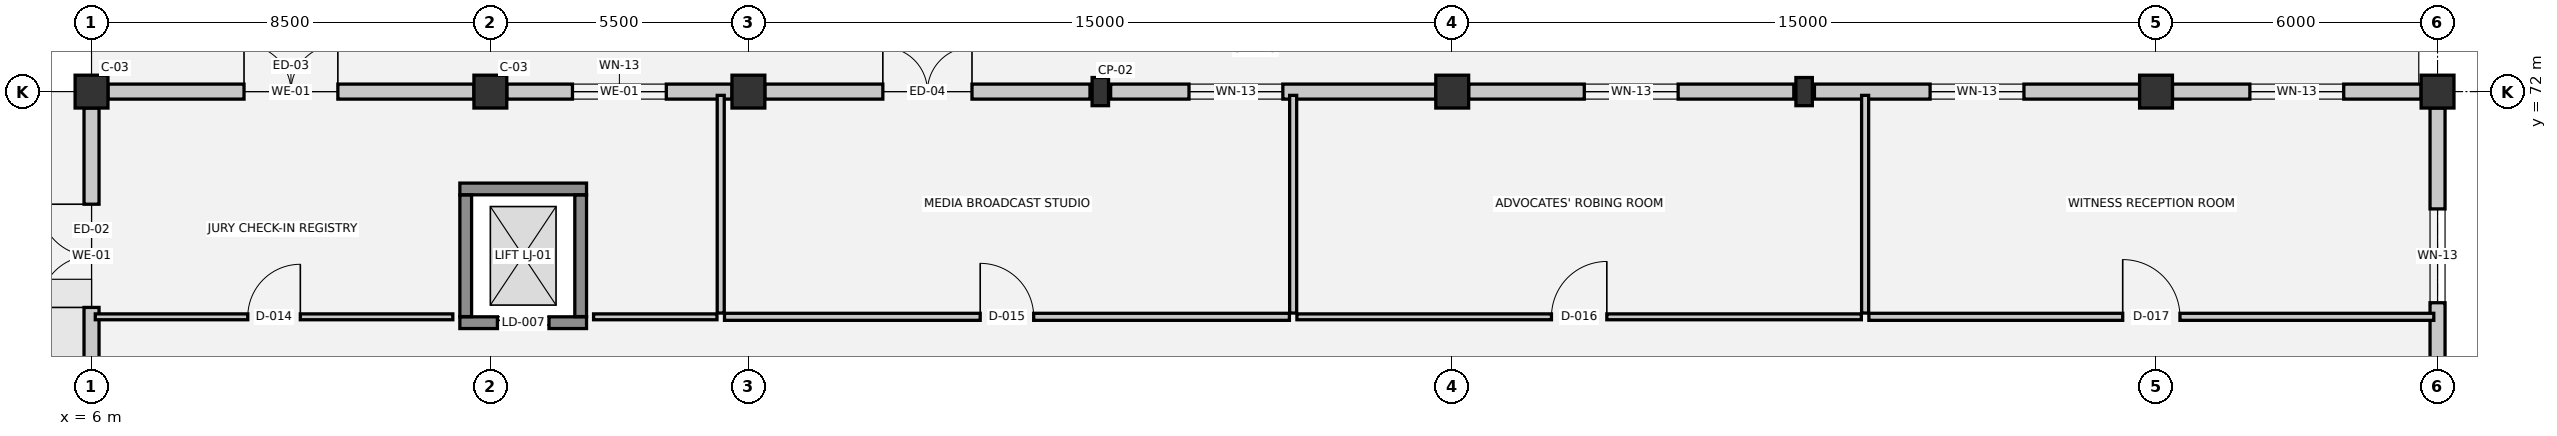
"""IFC4 building model, lengths in metres.
Left out: names, types, materials, properties, quantities, classifications, styles, units other than length and angle.
Written with IfcOpenShell. Run it as: python <this file> out.ifc"""

import sys

from ifc_helpers import new_model, si_unit, direction, frame, frame_2d, origin, origin_2d, place, context, subcontext, project, spatial, rectangle, extrude, element, fill, save


model = new_model("IFC4")
c1 = context("Model", 3, precision=1e-05, world=origin(), true_north=direction((0.0, 1.0)))
c2 = subcontext(c1, "Body", "Model", "MODEL_VIEW")
j1 = project(units=[si_unit("LENGTHUNIT", "METRE"), si_unit("PLANEANGLEUNIT", "RADIAN")], contexts=[c1])
p1 = place(None, origin())
s1 = spatial("IfcSite", under=j1, at=p1, CompositionType="ELEMENT")
p2 = place(p1, origin())
s2 = spatial("IfcBuilding", under=s1, at=p2, CompositionType="ELEMENT")
p3 = place(p2, origin())
s3 = spatial("IfcBuildingStorey", under=s2, at=p3, CompositionType="ELEMENT", Elevation=0.0)
for number, where, z_axis, x_axis in (
    (1, (6.0, 72.0, 0.0), (0.0, 0.0, 1.0), (1.0, 0.0, 0.0)),
    (2, (14.5, 72.0, 0.0), (0.0, 0.0, 1.0), (1.0, 0.0, 0.0)),
    (3, (20.0, 72.0, 0.0), (0.0, 0.0, 1.0), (1.0, 0.0, 0.0)),
    (4, (35.0, 72.0, 0.0), (0.0, 0.0, 1.0), (1.0, 0.0, 0.0)),
    (5, (50.0, 72.0, 0.0), (0.0, 0.0, 1.0), (1.0, 0.0, 0.0)),
    (6, (56.0, 72.0, 0.0), (0.0, 0.0, 1.0), (1.0, 0.0, 0.0)),
):
    element("IfcColumn", number, at=place(p3, frame(where, z_axis=z_axis, x_axis=x_axis)), inside=s3, PredefinedType="COLUMN", context=c2, shape_type="SweptSolid", body=[
        extrude(rectangle(XDim=0.7, YDim=0.7, at=origin_2d()), origin(), (0.0, 0.0, 1.0), 5.4),
    ])
for number, where, z_axis, x_axis in (
    (7, (27.5, 72.0, 0.0), (0.0, 0.0, 1.0), (1.0, 0.0, 0.0)),
    (8, (42.5, 72.0, 0.0), (0.0, 0.0, 1.0), (1.0, 0.0, 0.0)),
):
    element("IfcColumn", number, at=place(p3, frame(where, z_axis=z_axis, x_axis=x_axis)), inside=s3, PredefinedType="PILASTER", context=c2, shape_type="SweptSolid", body=[
        extrude(rectangle(XDim=0.35, YDim=0.6, at=origin_2d()), origin(), (0.0, 0.0, 1.0), 5.4),
    ])
p4 = place(p3, frame((6.0, 65.35, 0.0), z_axis=(0.0, 0.0, 1.0), x_axis=(0.0, 1.0, 0.0)))
e9 = element("IfcWall", 9, at=p4, inside=s3, PredefinedType="SOLIDWALL", context=c2, shape_type="SweptSolid", body=[
    extrude(rectangle(XDim=6.3, YDim=0.32, at=frame_2d((3.15, 0.0))), origin(), (0.0, 0.0, 1.0), 4.01),
])
p5 = place(p4, frame((2.05, 0.0, 0.0)))
e10 = element("IfcOpeningElement", 10, at=p5, cuts=e9, PredefinedType="OPENING", context=c2, shape_type="SweptSolid", body=[
    extrude(rectangle(XDim=2.2, YDim=2.4, at=frame_2d((1.1, 1.2))), frame((0.0, 0.17, 0.0), z_axis=(0.0, -1.0, 0.0), x_axis=(1.0, 0.0, 0.0)), (0.0, 0.0, 1.0), 0.34),
])
p6 = place(p3, frame((6.35, 72.0, 0.0), z_axis=(0.0, 0.0, 1.0), x_axis=(1.0, 0.0, 0.0)))
e11 = element("IfcWall", 11, at=p6, inside=s3, PredefinedType="SOLIDWALL", context=c2, shape_type="SweptSolid", body=[
    extrude(rectangle(XDim=7.8, YDim=0.32, at=frame_2d((3.9, 0.0))), origin(), (0.0, 0.0, 1.0), 4.01),
])
p7 = place(p6, frame((2.9, 0.0, 0.0)))
e12 = element("IfcOpeningElement", 12, at=p7, cuts=e11, PredefinedType="OPENING", context=c2, shape_type="SweptSolid", body=[
    extrude(rectangle(XDim=2.0, YDim=2.3, at=frame_2d((1.0, 1.15))), frame((0.0, 0.17, 0.0), z_axis=(0.0, -1.0, 0.0), x_axis=(1.0, 0.0, 0.0)), (0.0, 0.0, 1.0), 0.34),
])
p8 = place(p3, frame((14.85, 72.0, 0.0), z_axis=(0.0, 0.0, 1.0), x_axis=(1.0, 0.0, 0.0)))
e13 = element("IfcWall", 13, at=p8, inside=s3, PredefinedType="SOLIDWALL", context=c2, shape_type="SweptSolid", body=[
    extrude(rectangle(XDim=4.8, YDim=0.32, at=frame_2d((2.4, 0.0))), origin(), (0.0, 0.0, 1.0), 4.01),
])
p9 = place(p8, frame((1.4, 0.0, 0.9)))
e14 = element("IfcOpeningElement", 14, at=p9, cuts=e13, PredefinedType="OPENING", context=c2, shape_type="SweptSolid", body=[
    extrude(rectangle(XDim=2.0, YDim=2.2, at=frame_2d((1.0, 1.1))), frame((0.0, 0.17, 0.0), z_axis=(0.0, -1.0, 0.0), x_axis=(1.0, 0.0, 0.0)), (0.0, 0.0, 1.0), 0.34),
])
p10 = place(p3, frame((20.35, 72.0, 0.0), z_axis=(0.0, 0.0, 1.0), x_axis=(1.0, 0.0, 0.0)))
e15 = element("IfcWall", 15, at=p10, inside=s3, PredefinedType="SOLIDWALL", context=c2, shape_type="SweptSolid", body=[
    extrude(rectangle(XDim=6.93, YDim=0.32, at=frame_2d((3.465, 0.0))), origin(), (0.0, 0.0, 1.0), 4.01),
])
p11 = place(p10, frame((2.515, 0.0, 0.0)))
e16 = element("IfcOpeningElement", 16, at=p11, cuts=e15, PredefinedType="OPENING", context=c2, shape_type="SweptSolid", body=[
    extrude(rectangle(XDim=1.9, YDim=2.25, at=frame_2d((0.95, 1.125))), frame((0.0, 0.17, 0.0), z_axis=(0.0, -1.0, 0.0), x_axis=(1.0, 0.0, 0.0)), (0.0, 0.0, 1.0), 0.34),
])
p12 = place(p3, frame((27.72, 72.0, 0.0), z_axis=(0.0, 0.0, 1.0), x_axis=(1.0, 0.0, 0.0)))
e17 = element("IfcWall", 17, at=p12, inside=s3, PredefinedType="SOLIDWALL", context=c2, shape_type="SweptSolid", body=[
    extrude(rectangle(XDim=6.93, YDim=0.32, at=frame_2d((3.465, 0.0))), origin(), (0.0, 0.0, 1.0), 4.01),
])
p13 = place(p12, frame((1.67, 0.0, 0.9)))
e18 = element("IfcOpeningElement", 18, at=p13, cuts=e17, PredefinedType="OPENING", context=c2, shape_type="SweptSolid", body=[
    extrude(rectangle(XDim=2.0, YDim=2.2, at=frame_2d((1.0, 1.1))), frame((0.0, 0.17, 0.0), z_axis=(0.0, -1.0, 0.0), x_axis=(1.0, 0.0, 0.0)), (0.0, 0.0, 1.0), 0.34),
])
p14 = place(p3, frame((35.35, 72.0, 0.0), z_axis=(0.0, 0.0, 1.0), x_axis=(1.0, 0.0, 0.0)))
e19 = element("IfcWall", 19, at=p14, inside=s3, PredefinedType="SOLIDWALL", context=c2, shape_type="SweptSolid", body=[
    extrude(rectangle(XDim=6.93, YDim=0.32, at=frame_2d((3.465, 0.0))), origin(), (0.0, 0.0, 1.0), 4.01),
])
p15 = place(p14, frame((2.465, 0.0, 0.9)))
e20 = element("IfcOpeningElement", 20, at=p15, cuts=e19, PredefinedType="OPENING", context=c2, shape_type="SweptSolid", body=[
    extrude(rectangle(XDim=2.0, YDim=2.2, at=frame_2d((1.0, 1.1))), frame((0.0, 0.17, 0.0), z_axis=(0.0, -1.0, 0.0), x_axis=(1.0, 0.0, 0.0)), (0.0, 0.0, 1.0), 0.34),
])
p16 = place(p3, frame((42.72, 72.0, 0.0), z_axis=(0.0, 0.0, 1.0), x_axis=(1.0, 0.0, 0.0)))
e21 = element("IfcWall", 21, at=p16, inside=s3, PredefinedType="SOLIDWALL", context=c2, shape_type="SweptSolid", body=[
    extrude(rectangle(XDim=6.93, YDim=0.32, at=frame_2d((3.465, 0.0))), origin(), (0.0, 0.0, 1.0), 4.01),
])
p17 = place(p16, frame((2.465, 0.0, 0.9)))
e22 = element("IfcOpeningElement", 22, at=p17, cuts=e21, PredefinedType="OPENING", context=c2, shape_type="SweptSolid", body=[
    extrude(rectangle(XDim=2.0, YDim=2.2, at=frame_2d((1.0, 1.1))), frame((0.0, 0.17, 0.0), z_axis=(0.0, -1.0, 0.0), x_axis=(1.0, 0.0, 0.0)), (0.0, 0.0, 1.0), 0.34),
])
p18 = place(p3, frame((50.35, 72.0, 0.0), z_axis=(0.0, 0.0, 1.0), x_axis=(1.0, 0.0, 0.0)))
e23 = element("IfcWall", 23, at=p18, inside=s3, PredefinedType="SOLIDWALL", context=c2, shape_type="SweptSolid", body=[
    extrude(rectangle(XDim=5.3, YDim=0.32, at=frame_2d((2.65, 0.0))), origin(), (0.0, 0.0, 1.0), 4.01),
])
p19 = place(p18, frame((1.65, 0.0, 0.9)))
e24 = element("IfcOpeningElement", 24, at=p19, cuts=e23, PredefinedType="OPENING", context=c2, shape_type="SweptSolid", body=[
    extrude(rectangle(XDim=2.0, YDim=2.2, at=frame_2d((1.0, 1.1))), frame((0.0, 0.17, 0.0), z_axis=(0.0, -1.0, 0.0), x_axis=(1.0, 0.0, 0.0)), (0.0, 0.0, 1.0), 0.34),
])
p20 = place(p3, frame((56.0, 71.65, 0.0), z_axis=(0.0, 0.0, 1.0), x_axis=(0.0, -1.0, 0.0)))
e25 = element("IfcWall", 25, at=p20, inside=s3, PredefinedType="SOLIDWALL", context=c2, shape_type="SweptSolid", body=[
    extrude(rectangle(XDim=6.3, YDim=0.32, at=frame_2d((3.15, 0.0))), origin(), (0.0, 0.0, 1.0), 4.01),
])
p21 = place(p20, frame((2.15, 0.0, 0.9)))
e26 = element("IfcOpeningElement", 26, at=p21, cuts=e25, PredefinedType="OPENING", context=c2, shape_type="SweptSolid", body=[
    extrude(rectangle(XDim=2.0, YDim=2.2, at=frame_2d((1.0, 1.1))), frame((0.0, 0.17, 0.0), z_axis=(0.0, -1.0, 0.0), x_axis=(1.0, 0.0, 0.0)), (0.0, 0.0, 1.0), 0.34),
])
p22 = place(p3, frame((13.85, 67.075, 0.0), z_axis=(0.0, 0.0, 1.0), x_axis=(1.0, 0.0, 0.0)))
e27 = element("IfcWall", 27, at=p22, inside=s3, PredefinedType="SHEAR", context=c2, shape_type="SweptSolid", body=[
    extrude(rectangle(XDim=2.7, YDim=0.25, at=frame_2d((1.35, 0.0))), origin(), (0.0, 0.0, 1.0), 5.4),
])
p23 = place(p22, frame((0.8, 0.0, 0.0)))
e28 = element("IfcOpeningElement", 28, at=p23, cuts=e27, PredefinedType="OPENING", context=c2, shape_type="SweptSolid", body=[
    extrude(rectangle(XDim=1.1, YDim=2.15, at=frame_2d((0.55, 1.075))), frame((0.0, 0.135, 0.0), z_axis=(0.0, -1.0, 0.0), x_axis=(1.0, 0.0, 0.0)), (0.0, 0.0, 1.0), 0.27),
])
p24 = place(p3, frame((16.55, 69.925, 0.0), z_axis=(0.0, 0.0, 1.0), x_axis=(-1.0, 0.0, 0.0)))
e29 = element("IfcWall", 29, at=p24, inside=s3, PredefinedType="SHEAR", context=c2, shape_type="SweptSolid", body=[
    extrude(rectangle(XDim=2.7, YDim=0.25, at=frame_2d((1.35, 0.0))), origin(), (0.0, 0.0, 1.0), 5.4),
])
for number, where, z_axis, x_axis in (
    (30, (13.975, 69.795, 0.0), (0.0, 0.0, 1.0), (0.0, -1.0, 0.0)),
    (31, (16.425, 67.205, 0.0), (0.0, 0.0, 1.0), (0.0, 1.0, 0.0)),
):
    element("IfcWall", number, at=place(p3, frame(where, z_axis=z_axis, x_axis=x_axis)), inside=s3, PredefinedType="SHEAR", context=c2, shape_type="SweptSolid", body=[
        extrude(rectangle(XDim=2.59, YDim=0.25, at=frame_2d((1.295, 0.0))), origin(), (0.0, 0.0, 1.0), 5.4),
    ])
p25 = place(p3, frame((6.08, 67.2, 0.0), z_axis=(0.0, 0.0, 1.0), x_axis=(1.0, 0.0, 0.0)))
e32 = element("IfcWall", 32, at=p25, inside=s3, PredefinedType="PARTITIONING", context=c2, shape_type="SweptSolid", body=[
    extrude(rectangle(XDim=7.62, YDim=0.125, at=frame_2d((3.81, 0.0))), origin(), (0.0, 0.0, 1.0), 5.04),
])
p26 = place(p25, frame((3.25, 0.0, 0.0)))
e33 = element("IfcOpeningElement", 33, at=p26, cuts=e32, PredefinedType="OPENING", context=c2, shape_type="SweptSolid", body=[
    extrude(rectangle(XDim=1.12, YDim=2.2, at=frame_2d((0.56, 1.1))), frame((0.0, 0.073, 0.0), z_axis=(0.0, -1.0, 0.0), x_axis=(1.0, 0.0, 0.0)), (0.0, 0.0, 1.0), 0.145),
])
p27 = place(p3, frame((16.7, 67.2, 0.0), z_axis=(0.0, 0.0, 1.0), x_axis=(1.0, 0.0, 0.0)))
e34 = element("IfcWall", 34, at=p27, inside=s3, PredefinedType="PARTITIONING", context=c2, shape_type="SweptSolid", body=[
    extrude(rectangle(XDim=2.63, YDim=0.125, at=frame_2d((1.315, 0.0))), origin(), (0.0, 0.0, 1.0), 5.04),
])
p28 = place(p3, frame((19.49, 67.2, 0.0), z_axis=(0.0, 0.0, 1.0), x_axis=(1.0, 0.0, 0.0)))
e35 = element("IfcWall", 35, at=p28, inside=s3, PredefinedType="PARTITIONING", context=c2, shape_type="SweptSolid", body=[
    extrude(rectangle(XDim=12.04, YDim=0.15, at=frame_2d((6.02, 0.0))), origin(), (0.0, 0.0, 1.0), 5.04),
])
p29 = place(p28, frame((5.45, 0.0, 0.0)))
e36 = element("IfcOpeningElement", 36, at=p29, cuts=e35, PredefinedType="OPENING", context=c2, shape_type="SweptSolid", body=[
    extrude(rectangle(XDim=1.14, YDim=2.2, at=frame_2d((0.57, 1.1))), frame((0.0, 0.085, 0.0), z_axis=(0.0, -1.0, 0.0), x_axis=(1.0, 0.0, 0.0)), (0.0, 0.0, 1.0), 0.17),
])
p30 = place(p3, frame((31.69, 67.2, 0.0), z_axis=(0.0, 0.0, 1.0), x_axis=(1.0, 0.0, 0.0)))
e37 = element("IfcWall", 37, at=p30, inside=s3, PredefinedType="PARTITIONING", context=c2, shape_type="SweptSolid", body=[
    extrude(rectangle(XDim=12.03, YDim=0.125, at=frame_2d((6.015, 0.0))), origin(), (0.0, 0.0, 1.0), 5.04),
])
p31 = place(p30, frame((5.425, 0.0, 0.0)))
e38 = element("IfcOpeningElement", 38, at=p31, cuts=e37, PredefinedType="OPENING", context=c2, shape_type="SweptSolid", body=[
    extrude(rectangle(XDim=1.18, YDim=2.2, at=frame_2d((0.59, 1.1))), frame((0.0, 0.073, 0.0), z_axis=(0.0, -1.0, 0.0), x_axis=(1.0, 0.0, 0.0)), (0.0, 0.0, 1.0), 0.145),
])
p32 = place(p3, frame((43.88, 67.2, 0.0), z_axis=(0.0, 0.0, 1.0), x_axis=(1.0, 0.0, 0.0)))
e39 = element("IfcWall", 39, at=p32, inside=s3, PredefinedType="PARTITIONING", context=c2, shape_type="SweptSolid", body=[
    extrude(rectangle(XDim=12.04, YDim=0.15, at=frame_2d((6.02, 0.0))), origin(), (0.0, 0.0, 1.0), 5.04),
])
p33 = place(p32, frame((5.41, 0.0, 0.0)))
e40 = element("IfcOpeningElement", 40, at=p33, cuts=e39, PredefinedType="OPENING", context=c2, shape_type="SweptSolid", body=[
    extrude(rectangle(XDim=1.22, YDim=2.2, at=frame_2d((0.61, 1.1))), frame((0.0, 0.085, 0.0), z_axis=(0.0, -1.0, 0.0), x_axis=(1.0, 0.0, 0.0)), (0.0, 0.0, 1.0), 0.17),
])
for number, where, z_axis, x_axis in (
    (41, (19.41, 67.28, 0.0), (0.0, 0.0, 1.0), (0.0, 1.0, 0.0)),
    (42, (31.61, 67.28, 0.0), (0.0, 0.0, 1.0), (0.0, 1.0, 0.0)),
    (43, (43.8, 67.28, 0.0), (0.0, 0.0, 1.0), (0.0, 1.0, 0.0)),
):
    element("IfcWall", number, at=place(p3, frame(where, z_axis=z_axis, x_axis=x_axis)), inside=s3, PredefinedType="PARTITIONING", context=c2, shape_type="SweptSolid", body=[
        extrude(rectangle(XDim=4.64, YDim=0.15, at=frame_2d((2.32, 0.0))), origin(), (0.0, 0.0, 1.0), 5.04),
    ])
p34 = place(p5, origin())
e44 = element("IfcDoor", 44, at=p34, inside=s3, OperationType="DOUBLE_DOOR_SINGLE_SWING", PredefinedType="DOOR", context=c2, shape_type="SweptSolid", body=[
    extrude(rectangle(XDim=2.2, YDim=2.4, at=frame_2d((1.1, 1.2))), frame((0.0, 0.025, 0.0), z_axis=(0.0, -1.0, 0.0), x_axis=(1.0, 0.0, 0.0)), (0.0, 0.0, 1.0), 0.05),
])
fill(e10, e44)
p35 = place(p7, origin())
e45 = element("IfcDoor", 45, at=p35, inside=s3, OperationType="DOUBLE_DOOR_SINGLE_SWING", PredefinedType="DOOR", context=c2, shape_type="SweptSolid", body=[
    extrude(rectangle(XDim=2.0, YDim=2.3, at=frame_2d((1.0, 1.15))), frame((0.0, 0.025, 0.0), z_axis=(0.0, -1.0, 0.0), x_axis=(1.0, 0.0, 0.0)), (0.0, 0.0, 1.0), 0.05),
])
fill(e12, e45)
p36 = place(p9, origin())
e46 = element("IfcWindow", 46, at=p36, inside=s3, PartitioningType="SINGLE_PANEL", PredefinedType="WINDOW", context=c2, shape_type="SweptSolid", body=[
    extrude(rectangle(XDim=2.0, YDim=2.2, at=frame_2d((1.0, 1.1))), frame((0.0, 0.03, 0.0), z_axis=(0.0, -1.0, 0.0), x_axis=(1.0, 0.0, 0.0)), (0.0, 0.0, 1.0), 0.06),
])
fill(e14, e46)
p37 = place(p11, origin())
e47 = element("IfcDoor", 47, at=p37, inside=s3, OperationType="DOUBLE_DOOR_SINGLE_SWING", PredefinedType="DOOR", context=c2, shape_type="SweptSolid", body=[
    extrude(rectangle(XDim=1.9, YDim=2.25, at=frame_2d((0.95, 1.125))), frame((0.0, 0.025, 0.0), z_axis=(0.0, -1.0, 0.0), x_axis=(1.0, 0.0, 0.0)), (0.0, 0.0, 1.0), 0.05),
])
fill(e16, e47)
p38 = place(p13, origin())
e48 = element("IfcWindow", 48, at=p38, inside=s3, PartitioningType="SINGLE_PANEL", PredefinedType="WINDOW", context=c2, shape_type="SweptSolid", body=[
    extrude(rectangle(XDim=2.0, YDim=2.2, at=frame_2d((1.0, 1.1))), frame((0.0, 0.03, 0.0), z_axis=(0.0, -1.0, 0.0), x_axis=(1.0, 0.0, 0.0)), (0.0, 0.0, 1.0), 0.06),
])
fill(e18, e48)
p39 = place(p15, origin())
e49 = element("IfcWindow", 49, at=p39, inside=s3, PartitioningType="SINGLE_PANEL", PredefinedType="WINDOW", context=c2, shape_type="SweptSolid", body=[
    extrude(rectangle(XDim=2.0, YDim=2.2, at=frame_2d((1.0, 1.1))), frame((0.0, 0.03, 0.0), z_axis=(0.0, -1.0, 0.0), x_axis=(1.0, 0.0, 0.0)), (0.0, 0.0, 1.0), 0.06),
])
fill(e20, e49)
p40 = place(p17, origin())
e50 = element("IfcWindow", 50, at=p40, inside=s3, PartitioningType="SINGLE_PANEL", PredefinedType="WINDOW", context=c2, shape_type="SweptSolid", body=[
    extrude(rectangle(XDim=2.0, YDim=2.2, at=frame_2d((1.0, 1.1))), frame((0.0, 0.03, 0.0), z_axis=(0.0, -1.0, 0.0), x_axis=(1.0, 0.0, 0.0)), (0.0, 0.0, 1.0), 0.06),
])
fill(e22, e50)
p41 = place(p19, origin())
e51 = element("IfcWindow", 51, at=p41, inside=s3, PartitioningType="SINGLE_PANEL", PredefinedType="WINDOW", context=c2, shape_type="SweptSolid", body=[
    extrude(rectangle(XDim=2.0, YDim=2.2, at=frame_2d((1.0, 1.1))), frame((0.0, 0.03, 0.0), z_axis=(0.0, -1.0, 0.0), x_axis=(1.0, 0.0, 0.0)), (0.0, 0.0, 1.0), 0.06),
])
fill(e24, e51)
p42 = place(p21, origin())
e52 = element("IfcWindow", 52, at=p42, inside=s3, PartitioningType="SINGLE_PANEL", PredefinedType="WINDOW", context=c2, shape_type="SweptSolid", body=[
    extrude(rectangle(XDim=2.0, YDim=2.2, at=frame_2d((1.0, 1.1))), frame((0.0, 0.03, 0.0), z_axis=(0.0, -1.0, 0.0), x_axis=(1.0, 0.0, 0.0)), (0.0, 0.0, 1.0), 0.06),
])
fill(e26, e52)
p43 = place(p23, origin())
e53 = element("IfcDoor", 53, at=p43, inside=s3, OperationType="DOUBLE_DOOR_SLIDING", PredefinedType="DOOR", context=c2, shape_type="SweptSolid", body=[
    extrude(rectangle(XDim=1.1, YDim=2.15, at=frame_2d((0.55, 1.075))), frame((0.0, 0.025, 0.0), z_axis=(0.0, -1.0, 0.0), x_axis=(1.0, 0.0, 0.0)), (0.0, 0.0, 1.0), 0.05),
])
fill(e28, e53)
p44 = place(p26, origin())
e54 = element("IfcDoor", 54, at=p44, inside=s3, OperationType="SINGLE_SWING_RIGHT", PredefinedType="DOOR", context=c2, shape_type="SweptSolid", body=[
    extrude(rectangle(XDim=1.12, YDim=2.2, at=frame_2d((0.56, 1.1))), frame((0.0, 0.025, 0.0), z_axis=(0.0, -1.0, 0.0), x_axis=(1.0, 0.0, 0.0)), (0.0, 0.0, 1.0), 0.05),
])
fill(e33, e54)
p45 = place(p29, origin())
e55 = element("IfcDoor", 55, at=p45, inside=s3, OperationType="SINGLE_SWING_LEFT", PredefinedType="DOOR", context=c2, shape_type="SweptSolid", body=[
    extrude(rectangle(XDim=1.14, YDim=2.2, at=frame_2d((0.57, 1.1))), frame((0.0, 0.025, 0.0), z_axis=(0.0, -1.0, 0.0), x_axis=(1.0, 0.0, 0.0)), (0.0, 0.0, 1.0), 0.05),
])
fill(e36, e55)
p46 = place(p31, origin())
e56 = element("IfcDoor", 56, at=p46, inside=s3, OperationType="SINGLE_SWING_RIGHT", PredefinedType="DOOR", context=c2, shape_type="SweptSolid", body=[
    extrude(rectangle(XDim=1.18, YDim=2.2, at=frame_2d((0.59, 1.1))), frame((0.0, 0.025, 0.0), z_axis=(0.0, -1.0, 0.0), x_axis=(1.0, 0.0, 0.0)), (0.0, 0.0, 1.0), 0.05),
])
fill(e38, e56)
p47 = place(p33, origin())
e57 = element("IfcDoor", 57, at=p47, inside=s3, OperationType="SINGLE_SWING_LEFT", PredefinedType="DOOR", context=c2, shape_type="SweptSolid", body=[
    extrude(rectangle(XDim=1.22, YDim=2.2, at=frame_2d((0.61, 1.1))), frame((0.0, 0.025, 0.0), z_axis=(0.0, -1.0, 0.0), x_axis=(1.0, 0.0, 0.0)), (0.0, 0.0, 1.0), 0.05),
])
fill(e40, e57)
save(model, sys.argv[1])
